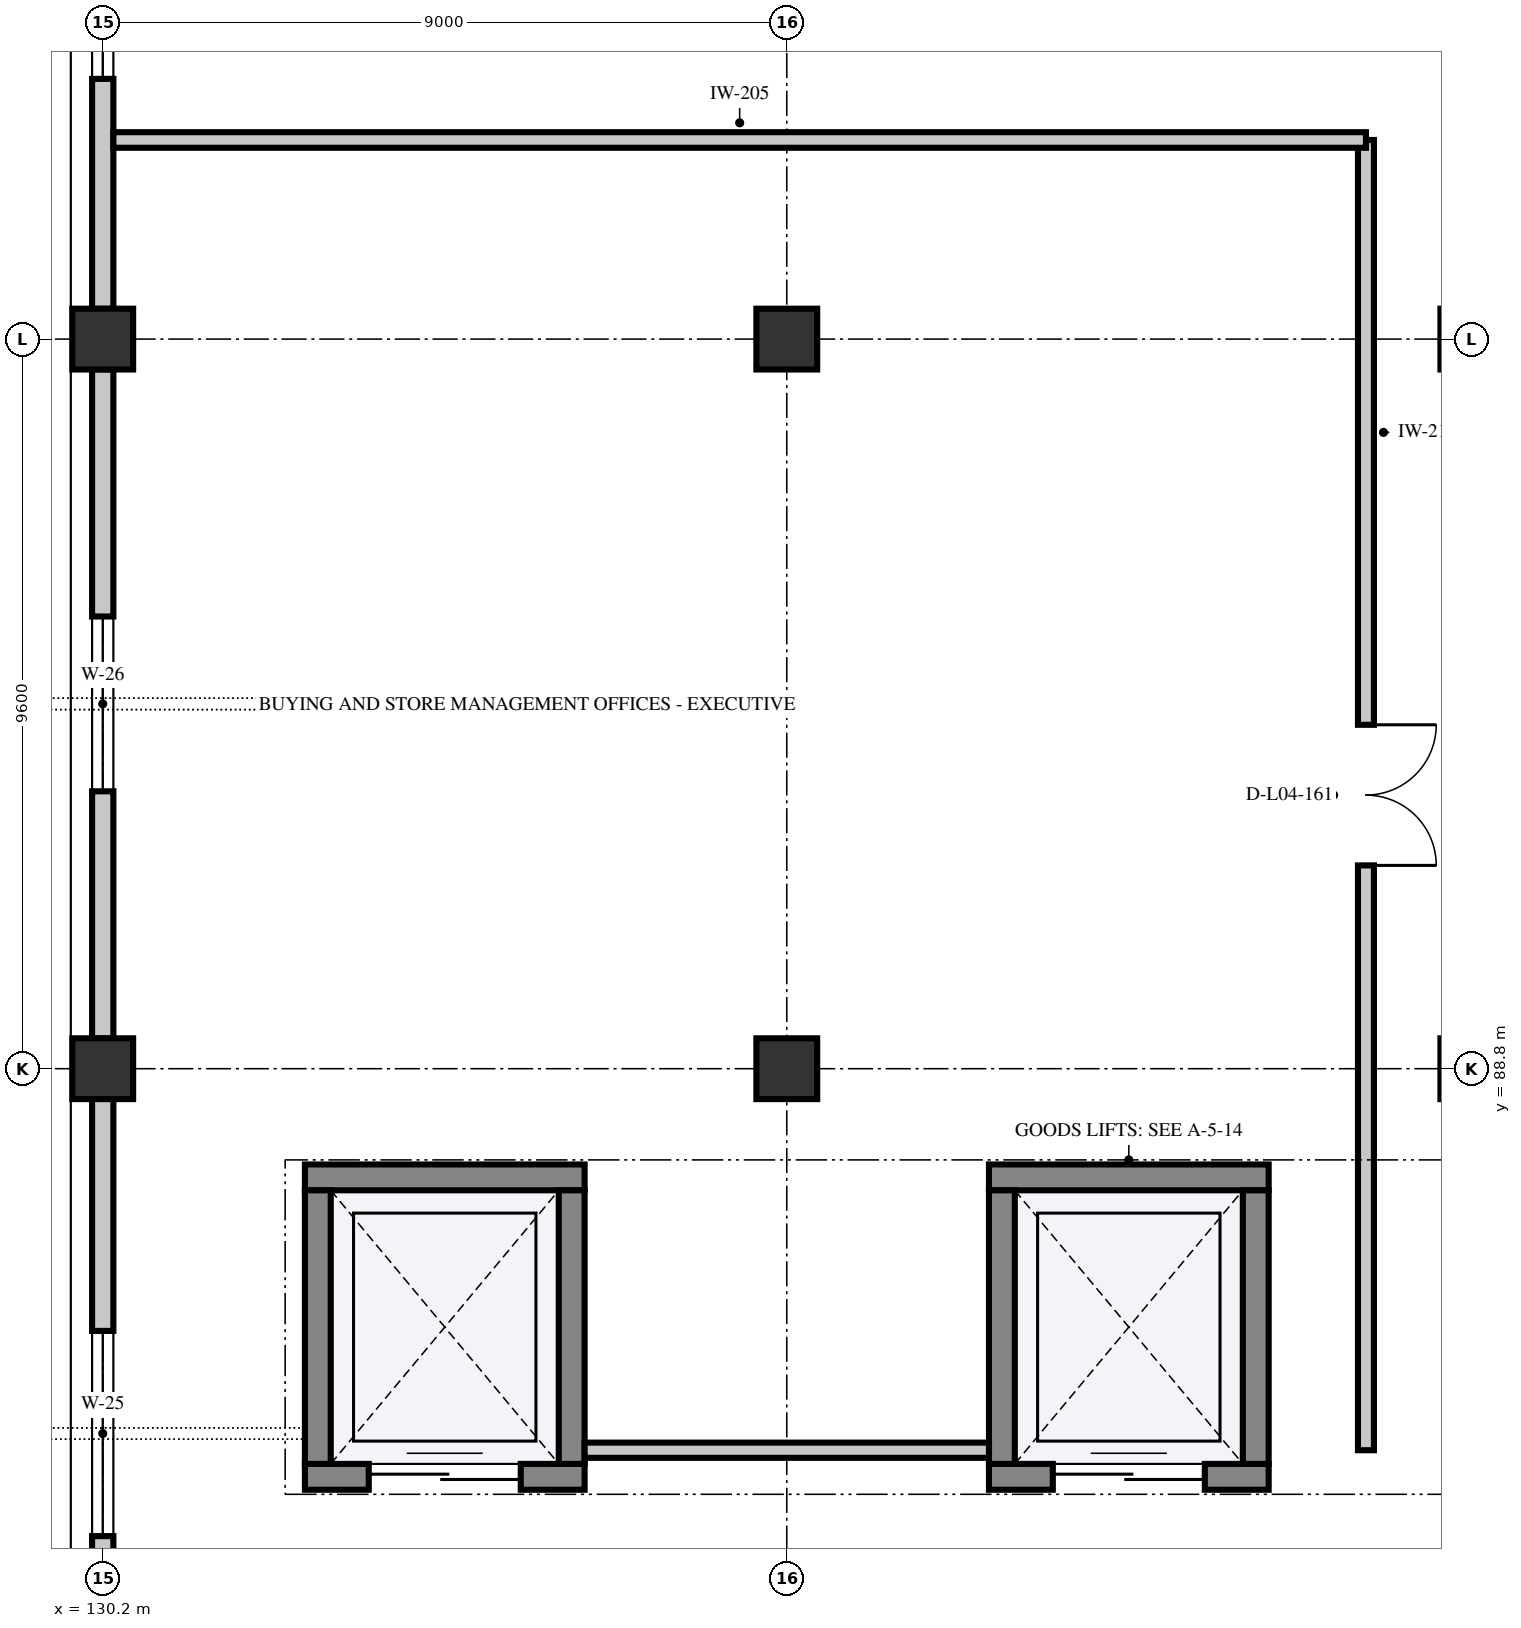
"""IFC4 building model, lengths in metres.
Left out: names, types, materials, properties, quantities, classifications, styles, units other than length and angle.
Written with IfcOpenShell. Run it as: python <this file> out.ifc"""

import sys

from ifc_helpers import new_model, si_unit, direction, frame, frame_2d, origin, origin_2d, place, context, subcontext, project, spatial, rectangle, extrude, element, fill, save


model = new_model("IFC4")
c1 = context("Model", 3, precision=1e-05, world=origin(), true_north=direction((0.0, 1.0)))
c2 = subcontext(c1, "Body", "Model", "MODEL_VIEW")
j1 = project(units=[si_unit("LENGTHUNIT", "METRE"), si_unit("PLANEANGLEUNIT", "RADIAN")], contexts=[c1])
p1 = place(None, origin())
s1 = spatial("IfcSite", under=j1, at=p1, CompositionType="ELEMENT")
p2 = place(p1, origin())
s2 = spatial("IfcBuilding", under=s1, at=p2, CompositionType="ELEMENT")
p3 = place(p2, frame((0.0, 0.0, 19.8)))
s3 = spatial("IfcBuildingStorey", under=s2, at=p3, CompositionType="ELEMENT", Elevation=19.8)
for number, where, z_axis, x_axis in (
    (1, (130.2, 88.8, 0.0), (0.0, 0.0, 1.0), (1.0, 0.0, 0.0)),
    (2, (130.2, 98.4, 0.0), (0.0, 0.0, 1.0), (1.0, 0.0, 0.0)),
    (3, (139.2, 88.8, 0.0), (0.0, 0.0, 1.0), (1.0, 0.0, 0.0)),
    (4, (139.2, 98.4, 0.0), (0.0, 0.0, 1.0), (1.0, 0.0, 0.0)),
    (5, (148.2, 88.8, 0.0), (0.0, 0.0, 1.0), (1.0, 0.0, 0.0)),
    (6, (148.2, 98.4, 0.0), (0.0, 0.0, 1.0), (1.0, 0.0, 0.0)),
):
    element("IfcColumn", number, at=place(p3, frame(where, z_axis=z_axis, x_axis=x_axis)), inside=s3, PredefinedType="COLUMN", context=c2, shape_type="SweptSolid", body=[
        extrude(rectangle(XDim=0.8, YDim=0.8, at=origin_2d()), origin(), (0.0, 0.0, 1.0), 4.8),
    ])
p4 = place(p3, frame((130.2, 79.598, 0.0), z_axis=(0.0, 0.0, 1.0), x_axis=(0.0, 1.0, 0.0)))
e7 = element("IfcWall", 7, at=p4, inside=s3, PredefinedType="SOLIDWALL", context=c2, shape_type="SweptSolid", body=[
    extrude(rectangle(XDim=8.804, YDim=0.28, at=frame_2d((4.402, 0.0))), origin(), (0.0, 0.0, 1.0), 4.48),
])
p5 = place(p4, frame((3.052, 0.0, 1.0)))
e8 = element("IfcOpeningElement", 8, at=p5, cuts=e7, PredefinedType="OPENING", context=c2, shape_type="SweptSolid", body=[
    extrude(rectangle(XDim=2.7, YDim=2.0, at=frame_2d((1.35, 1.0))), frame((0.0, 0.152, 0.0), z_axis=(0.0, -1.0, 0.0), x_axis=(1.0, 0.0, 0.0)), (0.0, 0.0, 1.0), 0.304),
])
p6 = place(p3, frame((130.2, 89.198, 0.0), z_axis=(0.0, 0.0, 1.0), x_axis=(0.0, 1.0, 0.0)))
e9 = element("IfcWall", 9, at=p6, inside=s3, PredefinedType="SOLIDWALL", context=c2, shape_type="SweptSolid", body=[
    extrude(rectangle(XDim=8.804, YDim=0.28, at=frame_2d((4.402, 0.0))), origin(), (0.0, 0.0, 1.0), 4.48),
])
p7 = place(p6, frame((3.252, 0.0, 1.05)))
e10 = element("IfcOpeningElement", 10, at=p7, cuts=e9, PredefinedType="OPENING", context=c2, shape_type="SweptSolid", body=[
    extrude(rectangle(XDim=2.3, YDim=1.9, at=frame_2d((1.15, 0.95))), frame((0.0, 0.152, 0.0), z_axis=(0.0, -1.0, 0.0), x_axis=(1.0, 0.0, 0.0)), (0.0, 0.0, 1.0), 0.304),
])
p8 = place(p3, frame((130.2, 98.798, 0.0), z_axis=(0.0, 0.0, 1.0), x_axis=(0.0, 1.0, 0.0)))
e11 = element("IfcWall", 11, at=p8, inside=s3, PredefinedType="SOLIDWALL", context=c2, shape_type="SweptSolid", body=[
    extrude(rectangle(XDim=8.002, YDim=0.28, at=frame_2d((4.001, 0.0))), origin(), (0.0, 0.0, 1.0), 4.48),
])
p9 = place(p8, frame((3.026, 0.0, 1.1)))
e12 = element("IfcOpeningElement", 12, at=p9, cuts=e11, PredefinedType="OPENING", context=c2, shape_type="SweptSolid", body=[
    extrude(rectangle(XDim=1.95, YDim=1.75, at=frame_2d((0.975, 0.875))), frame((0.0, 0.152, 0.0), z_axis=(0.0, -1.0, 0.0), x_axis=(1.0, 0.0, 0.0)), (0.0, 0.0, 1.0), 0.304),
])
p10 = place(p3, frame((132.86, 83.43, 0.0), z_axis=(0.0, 0.0, 1.0), x_axis=(1.0, 0.0, 0.0)))
e13 = element("IfcWall", 13, at=p10, inside=s3, PredefinedType="SHEAR", context=c2, shape_type="SweptSolid", body=[
    extrude(rectangle(XDim=3.68, YDim=0.34, at=frame_2d((1.84, 0.0))), origin(), (0.0, 0.0, 1.0), 4.48),
])
p11 = place(p10, frame((0.84, 0.0, 0.0)))
e14 = element("IfcOpeningElement", 14, at=p11, cuts=e13, PredefinedType="OPENING", context=c2, shape_type="SweptSolid", body=[
    extrude(rectangle(XDim=2.0, YDim=2.4, at=frame_2d((1.0, 1.2))), frame((0.0, 0.182, 0.0), z_axis=(0.0, -1.0, 0.0), x_axis=(1.0, 0.0, 0.0)), (0.0, 0.0, 1.0), 0.364),
])
p12 = place(p3, frame((132.86, 87.37, 0.0), z_axis=(0.0, 0.0, 1.0), x_axis=(1.0, 0.0, 0.0)))
e15 = element("IfcWall", 15, at=p12, inside=s3, PredefinedType="SHEAR", context=c2, shape_type="SweptSolid", body=[
    extrude(rectangle(XDim=3.68, YDim=0.34, at=frame_2d((1.84, 0.0))), origin(), (0.0, 0.0, 1.0), 4.48),
])
for number, where, z_axis, x_axis in (
    (16, (133.03, 83.6, 0.0), (0.0, 0.0, 1.0), (0.0, 1.0, 0.0)),
    (17, (136.37, 83.6, 0.0), (0.0, 0.0, 1.0), (0.0, 1.0, 0.0)),
):
    element("IfcWall", number, at=place(p3, frame(where, z_axis=z_axis, x_axis=x_axis)), inside=s3, PredefinedType="SHEAR", context=c2, shape_type="SweptSolid", body=[
        extrude(rectangle(XDim=3.6, YDim=0.34, at=frame_2d((1.8, 0.0))), origin(), (0.0, 0.0, 1.0), 4.48),
    ])
p13 = place(p3, frame((141.86, 83.43, 0.0), z_axis=(0.0, 0.0, 1.0), x_axis=(1.0, 0.0, 0.0)))
e18 = element("IfcWall", 18, at=p13, inside=s3, PredefinedType="SHEAR", context=c2, shape_type="SweptSolid", body=[
    extrude(rectangle(XDim=3.68, YDim=0.34, at=frame_2d((1.84, 0.0))), origin(), (0.0, 0.0, 1.0), 4.48),
])
p14 = place(p13, frame((0.84, 0.0, 0.0)))
e19 = element("IfcOpeningElement", 19, at=p14, cuts=e18, PredefinedType="OPENING", context=c2, shape_type="SweptSolid", body=[
    extrude(rectangle(XDim=2.0, YDim=2.4, at=frame_2d((1.0, 1.2))), frame((0.0, 0.182, 0.0), z_axis=(0.0, -1.0, 0.0), x_axis=(1.0, 0.0, 0.0)), (0.0, 0.0, 1.0), 0.364),
])
p15 = place(p3, frame((141.86, 87.37, 0.0), z_axis=(0.0, 0.0, 1.0), x_axis=(1.0, 0.0, 0.0)))
e20 = element("IfcWall", 20, at=p15, inside=s3, PredefinedType="SHEAR", context=c2, shape_type="SweptSolid", body=[
    extrude(rectangle(XDim=3.68, YDim=0.34, at=frame_2d((1.84, 0.0))), origin(), (0.0, 0.0, 1.0), 4.48),
])
for number, where, z_axis, x_axis in (
    (21, (142.03, 83.6, 0.0), (0.0, 0.0, 1.0), (0.0, 1.0, 0.0)),
    (22, (145.37, 83.6, 0.0), (0.0, 0.0, 1.0), (0.0, 1.0, 0.0)),
):
    element("IfcWall", number, at=place(p3, frame(where, z_axis=z_axis, x_axis=x_axis)), inside=s3, PredefinedType="SHEAR", context=c2, shape_type="SweptSolid", body=[
        extrude(rectangle(XDim=3.6, YDim=0.34, at=frame_2d((1.8, 0.0))), origin(), (0.0, 0.0, 1.0), 4.48),
    ])
p16 = place(p3, frame((146.82, 101.02, 0.0), z_axis=(0.0, 0.0, 1.0), x_axis=(0.0, -1.0, 0.0)))
e23 = element("IfcWall", 23, at=p16, inside=s3, PredefinedType="PARTITIONING", context=c2, shape_type="SweptSolid", body=[
    extrude(rectangle(XDim=17.24, YDim=0.21, at=frame_2d((8.62, 0.0))), origin(), (0.0, 0.0, 1.0), 4.48),
])
p17 = place(p16, frame((7.695, 0.0, 0.0)))
e24 = element("IfcOpeningElement", 24, at=p17, cuts=e23, PredefinedType="OPENING", context=c2, shape_type="SweptSolid", body=[
    extrude(rectangle(XDim=1.85, YDim=2.35, at=frame_2d((0.925, 1.175))), frame((0.0, 0.117, 0.0), z_axis=(0.0, -1.0, 0.0), x_axis=(1.0, 0.0, 0.0)), (0.0, 0.0, 1.0), 0.234),
])
p18 = place(p3, frame((130.34, 101.02, 0.0), z_axis=(0.0, 0.0, 1.0), x_axis=(1.0, 0.0, 0.0)))
e25 = element("IfcWall", 25, at=p18, inside=s3, PredefinedType="PARTITIONING", context=c2, shape_type="SweptSolid", body=[
    extrude(rectangle(XDim=16.48, YDim=0.205, at=frame_2d((8.24, 0.0))), origin(), (0.0, 0.0, 1.0), 4.48),
])
p19 = place(p3, frame((141.86, 83.78, 0.0), z_axis=(0.0, 0.0, 1.0), x_axis=(-1.0, 0.0, 0.0)))
e26 = element("IfcWall", 26, at=p19, inside=s3, PredefinedType="PARTITIONING", context=c2, shape_type="SweptSolid", body=[
    extrude(rectangle(XDim=5.32, YDim=0.2, at=frame_2d((2.66, 0.0))), origin(), (0.0, 0.0, 1.0), 4.48),
])
p20 = place(p5, origin())
e27 = element("IfcWindow", 27, at=p20, inside=s3, PartitioningType="SINGLE_PANEL", PredefinedType="WINDOW", context=c2, shape_type="SweptSolid", body=[
    extrude(rectangle(XDim=2.7, YDim=2.0, at=frame_2d((1.35, 1.0))), frame((0.0, 0.03, 0.0), z_axis=(0.0, -1.0, 0.0), x_axis=(1.0, 0.0, 0.0)), (0.0, 0.0, 1.0), 0.06),
])
fill(e8, e27)
p21 = place(p7, origin())
e28 = element("IfcWindow", 28, at=p21, inside=s3, PartitioningType="SINGLE_PANEL", PredefinedType="WINDOW", context=c2, shape_type="SweptSolid", body=[
    extrude(rectangle(XDim=2.3, YDim=1.9, at=frame_2d((1.15, 0.95))), frame((0.0, 0.03, 0.0), z_axis=(0.0, -1.0, 0.0), x_axis=(1.0, 0.0, 0.0)), (0.0, 0.0, 1.0), 0.06),
])
fill(e10, e28)
p22 = place(p9, origin())
e29 = element("IfcWindow", 29, at=p22, inside=s3, PartitioningType="SINGLE_PANEL", PredefinedType="WINDOW", context=c2, shape_type="SweptSolid", body=[
    extrude(rectangle(XDim=1.95, YDim=1.75, at=frame_2d((0.975, 0.875))), frame((0.0, 0.03, 0.0), z_axis=(0.0, -1.0, 0.0), x_axis=(1.0, 0.0, 0.0)), (0.0, 0.0, 1.0), 0.06),
])
fill(e12, e29)
p23 = place(p11, origin())
e30 = element("IfcDoor", 30, at=p23, inside=s3, OperationType="DOUBLE_DOOR_SLIDING", PredefinedType="DOOR", context=c2, shape_type="SweptSolid", body=[
    extrude(rectangle(XDim=2.0, YDim=2.4, at=frame_2d((1.0, 1.2))), frame((0.0, 0.025, 0.0), z_axis=(0.0, -1.0, 0.0), x_axis=(1.0, 0.0, 0.0)), (0.0, 0.0, 1.0), 0.05),
])
fill(e14, e30)
p24 = place(p14, origin())
e31 = element("IfcDoor", 31, at=p24, inside=s3, OperationType="DOUBLE_DOOR_SLIDING", PredefinedType="DOOR", context=c2, shape_type="SweptSolid", body=[
    extrude(rectangle(XDim=2.0, YDim=2.4, at=frame_2d((1.0, 1.2))), frame((0.0, 0.025, 0.0), z_axis=(0.0, -1.0, 0.0), x_axis=(1.0, 0.0, 0.0)), (0.0, 0.0, 1.0), 0.05),
])
fill(e19, e31)
p25 = place(p17, origin())
e32 = element("IfcDoor", 32, at=p25, inside=s3, OperationType="DOUBLE_DOOR_SINGLE_SWING", PredefinedType="DOOR", context=c2, shape_type="SweptSolid", body=[
    extrude(rectangle(XDim=1.85, YDim=2.35, at=frame_2d((0.925, 1.175))), frame((0.0, 0.025, 0.0), z_axis=(0.0, -1.0, 0.0), x_axis=(1.0, 0.0, 0.0)), (0.0, 0.0, 1.0), 0.05),
])
fill(e24, e32)
save(model, sys.argv[1])
